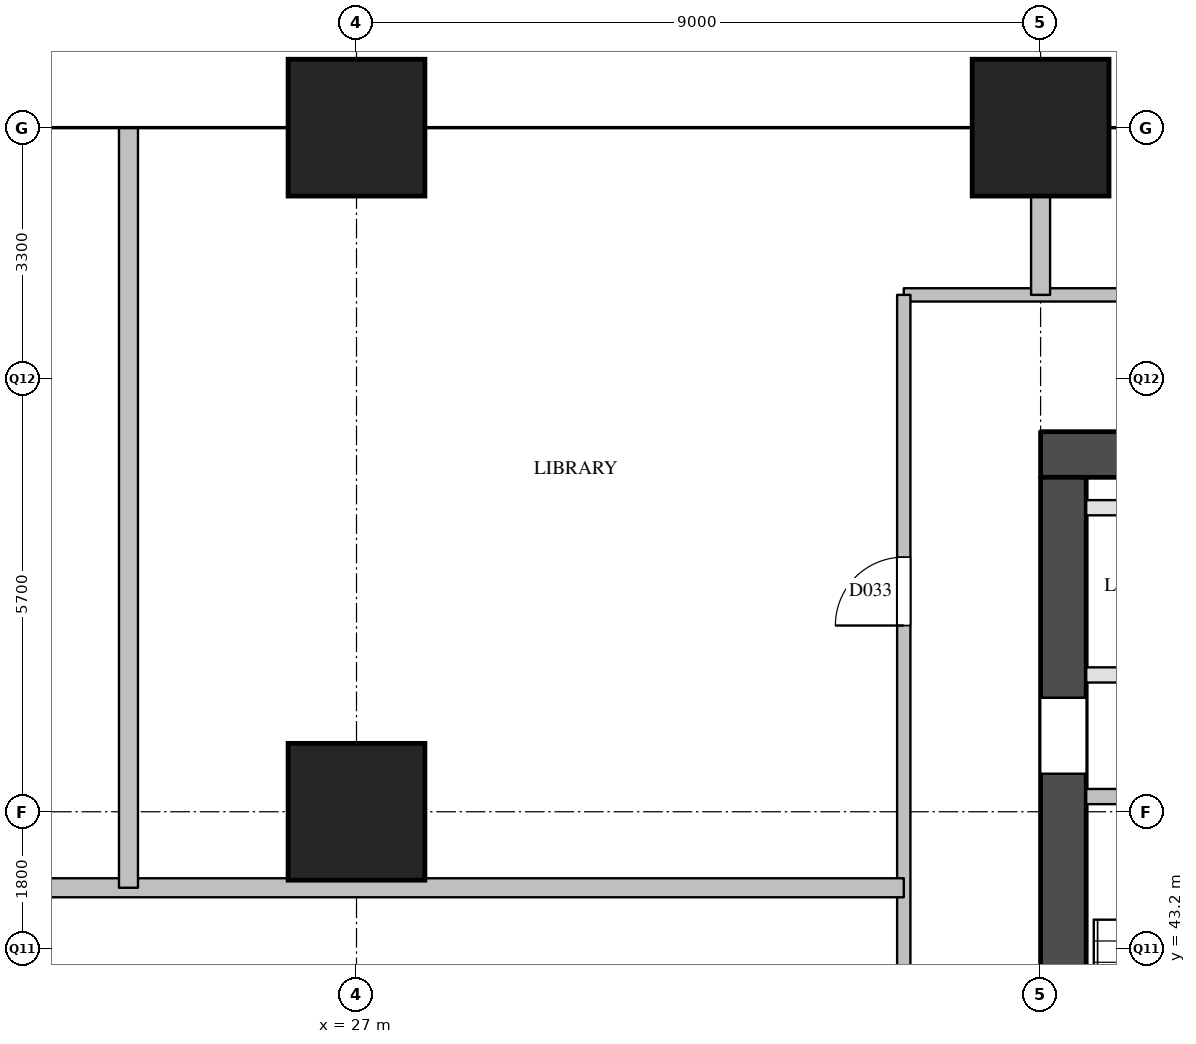
"""IFC4 building model, lengths in metres.
Left out: names, types, materials, properties, quantities, classifications, styles, units other than length and angle.
Written with IfcOpenShell. Run it as: python <this file> out.ifc"""

import sys

from ifc_helpers import new_model, si_unit, direction, frame, frame_2d, origin, origin_2d, place, context, subcontext, project, spatial, rectangle, extrude, element, fill, save


model = new_model("IFC4")
c1 = context("Model", 3, precision=1e-05, world=origin(), true_north=direction((0.0, 1.0)))
c2 = subcontext(c1, "Body", "Model", "MODEL_VIEW")
j1 = project(units=[si_unit("LENGTHUNIT", "METRE"), si_unit("PLANEANGLEUNIT", "RADIAN")], contexts=[c1])
p1 = place(None, origin())
s1 = spatial("IfcSite", under=j1, at=p1, CompositionType="ELEMENT")
p2 = place(p1, origin())
s2 = spatial("IfcBuilding", under=s1, at=p2, CompositionType="ELEMENT")
p3 = place(p2, frame((0.0, 0.0, 108.2)))
s3 = spatial("IfcBuildingStorey", under=s2, at=p3, CompositionType="ELEMENT", Elevation=108.2)
for number, where, z_axis, x_axis in (
    (1, (27.0, 45.0, 0.0), (0.0, 0.0, 1.0), (1.0, 0.0, 0.0)),
    (2, (27.0, 54.0, 0.0), (0.0, 0.0, 1.0), (1.0, 0.0, 0.0)),
    (3, (36.0, 54.0, 0.0), (0.0, 0.0, 1.0), (1.0, 0.0, 0.0)),
):
    element("IfcColumn", number, at=place(p3, frame(where, z_axis=z_axis, x_axis=x_axis)), inside=s3, PredefinedType="COLUMN", context=c2, shape_type="SweptSolid", body=[
        extrude(rectangle(XDim=1.8, YDim=1.8, at=origin_2d()), origin(), (0.0, 0.0, 1.0), 3.8),
    ])
p4 = place(p3, frame((36.0, 49.7, 0.0), z_axis=(0.0, 0.0, 1.0), x_axis=(1.0, 0.0, 0.0)))
e4 = element("IfcWall", 4, at=p4, inside=s3, PredefinedType="SHEAR", context=c2, shape_type="SweptSolid", body=[
    extrude(rectangle(XDim=12.4, YDim=0.6, at=frame_2d((6.2, 0.0))), origin(), (0.0, 0.0, 1.0), 3.5),
])
p5 = place(p3, frame((36.3, 29.1, 0.0), z_axis=(0.0, 0.0, 1.0), x_axis=(0.0, 1.0, 0.0)))
e5 = element("IfcWall", 5, at=p5, inside=s3, PredefinedType="SHEAR", context=c2, shape_type="SweptSolid", body=[
    extrude(rectangle(XDim=20.3, YDim=0.6, at=frame_2d((10.15, 0.0))), origin(), (0.0, 0.0, 1.0), 3.5),
])
p6 = place(p5, frame((3.6, 0.0, 0.0)))
e6 = element("IfcOpeningElement", 6, at=p6, cuts=e5, PredefinedType="OPENING", context=c2, shape_type="SweptSolid", body=[
    extrude(rectangle(XDim=1.8, YDim=2.1, at=frame_2d((0.9, 1.05))), frame((0.0, 0.31, 0.0), z_axis=(0.0, -1.0, 0.0), x_axis=(1.0, 0.0, 0.0)), (0.0, 0.0, 1.0), 0.62),
])
p7 = place(p5, frame((16.4, 0.0, 0.0)))
e7 = element("IfcOpeningElement", 7, at=p7, cuts=e5, PredefinedType="OPENING", context=c2, shape_type="SweptSolid", body=[
    extrude(rectangle(XDim=1.0, YDim=2.1, at=frame_2d((0.5, 1.05))), frame((0.0, 0.31, 0.0), z_axis=(0.0, -1.0, 0.0), x_axis=(1.0, 0.0, 0.0)), (0.0, 0.0, 1.0), 0.62),
])
p8 = place(p3, frame((36.6, 45.2, 0.0), z_axis=(0.0, 0.0, 1.0), x_axis=(1.0, 0.0, 0.0)))
e8 = element("IfcWall", 8, at=p8, inside=s3, PredefinedType="SOLIDWALL", context=c2, shape_type="SweptSolid", body=[
    extrude(rectangle(XDim=10.05, YDim=0.2, at=frame_2d((5.025, 0.0))), origin(), (0.0, 0.0, 1.0), 3.5),
])
p9 = place(p8, frame((1.125, 0.0, 0.0)))
e9 = element("IfcOpeningElement", 9, at=p9, cuts=e8, PredefinedType="OPENING", context=c2, shape_type="SweptSolid", body=[
    extrude(rectangle(XDim=1.1, YDim=2.1, at=frame_2d((0.55, 1.05))), frame((0.0, 0.11, 0.0), z_axis=(0.0, -1.0, 0.0), x_axis=(1.0, 0.0, 0.0)), (0.0, 0.0, 1.0), 0.22),
])
p10 = place(p8, frame((4.475, 0.0, 0.0)))
e10 = element("IfcOpeningElement", 10, at=p10, cuts=e8, PredefinedType="OPENING", context=c2, shape_type="SweptSolid", body=[
    extrude(rectangle(XDim=1.1, YDim=2.1, at=frame_2d((0.55, 1.05))), frame((0.0, 0.11, 0.0), z_axis=(0.0, -1.0, 0.0), x_axis=(1.0, 0.0, 0.0)), (0.0, 0.0, 1.0), 0.22),
])
p11 = place(p8, frame((7.825, 0.0, 0.0)))
e11 = element("IfcOpeningElement", 11, at=p11, cuts=e8, PredefinedType="OPENING", context=c2, shape_type="SweptSolid", body=[
    extrude(rectangle(XDim=1.1, YDim=2.1, at=frame_2d((0.55, 1.05))), frame((0.0, 0.11, 0.0), z_axis=(0.0, -1.0, 0.0), x_axis=(1.0, 0.0, 0.0)), (0.0, 0.0, 1.0), 0.22),
])
p12 = place(p3, frame((36.6, 46.8, 0.0), z_axis=(0.0, 0.0, 1.0), x_axis=(1.0, 0.0, 0.0)))
e12 = element("IfcWall", 12, at=p12, inside=s3, PredefinedType="PARTITIONING", context=c2, shape_type="SweptSolid", body=[
    extrude(rectangle(XDim=11.2, YDim=0.2, at=frame_2d((5.6, 0.0))), origin(), (0.0, 0.0, 1.0), 3.5),
])
p13 = place(p12, frame((1.23, 0.0, 0.0)))
e13 = element("IfcOpeningElement", 13, at=p13, cuts=e12, PredefinedType="OPENING", context=c2, shape_type="SweptSolid", body=[
    extrude(rectangle(XDim=0.9, YDim=2.1, at=frame_2d((0.45, 1.05))), frame((0.0, 0.11, 0.0), z_axis=(0.0, -1.0, 0.0), x_axis=(1.0, 0.0, 0.0)), (0.0, 0.0, 1.0), 0.22),
])
p14 = place(p12, frame((6.83, 0.0, 0.0)))
e14 = element("IfcOpeningElement", 14, at=p14, cuts=e12, PredefinedType="OPENING", context=c2, shape_type="SweptSolid", body=[
    extrude(rectangle(XDim=0.9, YDim=2.1, at=frame_2d((0.45, 1.05))), frame((0.0, 0.11, 0.0), z_axis=(0.0, -1.0, 0.0), x_axis=(1.0, 0.0, 0.0)), (0.0, 0.0, 1.0), 0.22),
])
p15 = place(p3, frame((36.6, 49.0, 0.0), z_axis=(0.0, 0.0, 1.0), x_axis=(1.0, 0.0, 0.0)))
e15 = element("IfcWall", 15, at=p15, inside=s3, PredefinedType="PARTITIONING", context=c2, shape_type="SweptSolid", body=[
    extrude(rectangle(XDim=11.2, YDim=0.2, at=frame_2d((5.6, 0.0))), origin(), (0.0, 0.0, 1.0), 3.5),
])
p16 = place(p3, frame((34.2, 51.8, 0.0), z_axis=(0.0, 0.0, 1.0), x_axis=(1.0, 0.0, 0.0)))
e16 = element("IfcWall", 16, at=p16, inside=s3, PredefinedType="PARTITIONING", context=c2, shape_type="SweptSolid", body=[
    extrude(rectangle(XDim=16.0, YDim=0.175, at=frame_2d((8.0, 0.0))), origin(), (0.0, 0.0, 1.0), 3.5),
])
p17 = place(p16, frame((7.189, 0.0, 0.0)))
e17 = element("IfcOpeningElement", 17, at=p17, cuts=e16, PredefinedType="OPENING", context=c2, shape_type="SweptSolid", body=[
    extrude(rectangle(XDim=0.9, YDim=2.1, at=frame_2d((0.45, 1.05))), frame((0.0, 0.097, 0.0), z_axis=(0.0, -1.0, 0.0), x_axis=(1.0, 0.0, 0.0)), (0.0, 0.0, 1.0), 0.195),
])
p18 = place(p3, frame((34.2, 29.12, 0.0), z_axis=(0.0, 0.0, 1.0), x_axis=(0.0, 1.0, 0.0)))
e18 = element("IfcWall", 18, at=p18, inside=s3, PredefinedType="PARTITIONING", context=c2, shape_type="SweptSolid", body=[
    extrude(rectangle(XDim=22.68, YDim=0.175, at=frame_2d((11.34, 0.0))), origin(), (0.0, 0.0, 1.0), 3.5),
])
p19 = place(p18, frame((0.94, 0.0, 0.0)))
e19 = element("IfcOpeningElement", 19, at=p19, cuts=e18, PredefinedType="OPENING", context=c2, shape_type="SweptSolid", body=[
    extrude(rectangle(XDim=1.0, YDim=2.1, at=frame_2d((0.5, 1.05))), frame((0.0, 0.097, 0.0), z_axis=(0.0, -1.0, 0.0), x_axis=(1.0, 0.0, 0.0)), (0.0, 0.0, 1.0), 0.195),
])
p20 = place(p18, frame((4.38, 0.0, 0.0)))
e20 = element("IfcOpeningElement", 20, at=p20, cuts=e18, PredefinedType="OPENING", context=c2, shape_type="SweptSolid", body=[
    extrude(rectangle(XDim=1.0, YDim=2.1, at=frame_2d((0.5, 1.05))), frame((0.0, 0.097, 0.0), z_axis=(0.0, -1.0, 0.0), x_axis=(1.0, 0.0, 0.0)), (0.0, 0.0, 1.0), 0.195),
])
p21 = place(p18, frame((10.43, 0.0, 0.0)))
e21 = element("IfcOpeningElement", 21, at=p21, cuts=e18, PredefinedType="OPENING", context=c2, shape_type="SweptSolid", body=[
    extrude(rectangle(XDim=0.9, YDim=2.1, at=frame_2d((0.45, 1.05))), frame((0.0, 0.097, 0.0), z_axis=(0.0, -1.0, 0.0), x_axis=(1.0, 0.0, 0.0)), (0.0, 0.0, 1.0), 0.195),
])
p22 = place(p18, frame((18.33, 0.0, 0.0)))
e22 = element("IfcOpeningElement", 22, at=p22, cuts=e18, PredefinedType="OPENING", context=c2, shape_type="SweptSolid", body=[
    extrude(rectangle(XDim=0.9, YDim=2.1, at=frame_2d((0.45, 1.05))), frame((0.0, 0.097, 0.0), z_axis=(0.0, -1.0, 0.0), x_axis=(1.0, 0.0, 0.0)), (0.0, 0.0, 1.0), 0.195),
])
p23 = place(p3, frame((19.875, 44.0, 0.0), z_axis=(0.0, 0.0, 1.0), x_axis=(1.0, 0.0, 0.0)))
e23 = element("IfcWall", 23, at=p23, inside=s3, PredefinedType="PARTITIONING", context=c2, shape_type="SweptSolid", body=[
    extrude(rectangle(XDim=14.325, YDim=0.25, at=frame_2d((7.163, 0.0))), origin(), (0.0, 0.0, 1.0), 2.5),
])
p24 = place(p3, frame((24.0, 44.0, 0.0), z_axis=(0.0, 0.0, 1.0), x_axis=(0.0, 1.0, 0.0)))
e24 = element("IfcWall", 24, at=p24, inside=s3, PredefinedType="PARTITIONING", context=c2, shape_type="SweptSolid", body=[
    extrude(rectangle(XDim=10.0, YDim=0.25, at=frame_2d((5.0, 0.0))), origin(), (0.0, 0.0, 1.0), 2.5),
])
p25 = place(p3, frame((36.0, 51.8, 0.0), z_axis=(0.0, 0.0, 1.0), x_axis=(0.0, 1.0, 0.0)))
e25 = element("IfcWall", 25, at=p25, inside=s3, PredefinedType="PARTITIONING", context=c2, shape_type="SweptSolid", body=[
    extrude(rectangle(XDim=2.2, YDim=0.25, at=frame_2d((1.1, 0.0))), origin(), (0.0, 0.0, 1.0), 3.5),
])
p26 = place(p7, origin())
e26 = element("IfcDoor", 26, at=p26, inside=s3, OperationType="SINGLE_SWING_RIGHT", PredefinedType="DOOR", context=c2, shape_type="SweptSolid", body=[
    extrude(rectangle(XDim=1.0, YDim=2.1, at=frame_2d((0.5, 1.05))), frame((0.0, 0.025, 0.0), z_axis=(0.0, -1.0, 0.0), x_axis=(1.0, 0.0, 0.0)), (0.0, 0.0, 1.0), 0.05),
])
fill(e7, e26)
p27 = place(p22, origin())
e27 = element("IfcDoor", 27, at=p27, inside=s3, OperationType="SINGLE_SWING_LEFT", PredefinedType="DOOR", context=c2, shape_type="SweptSolid", body=[
    extrude(rectangle(XDim=0.9, YDim=2.1, at=frame_2d((0.45, 1.05))), frame((0.0, 0.025, 0.0), z_axis=(0.0, -1.0, 0.0), x_axis=(1.0, 0.0, 0.0)), (0.0, 0.0, 1.0), 0.05),
])
fill(e22, e27)
save(model, sys.argv[1])
